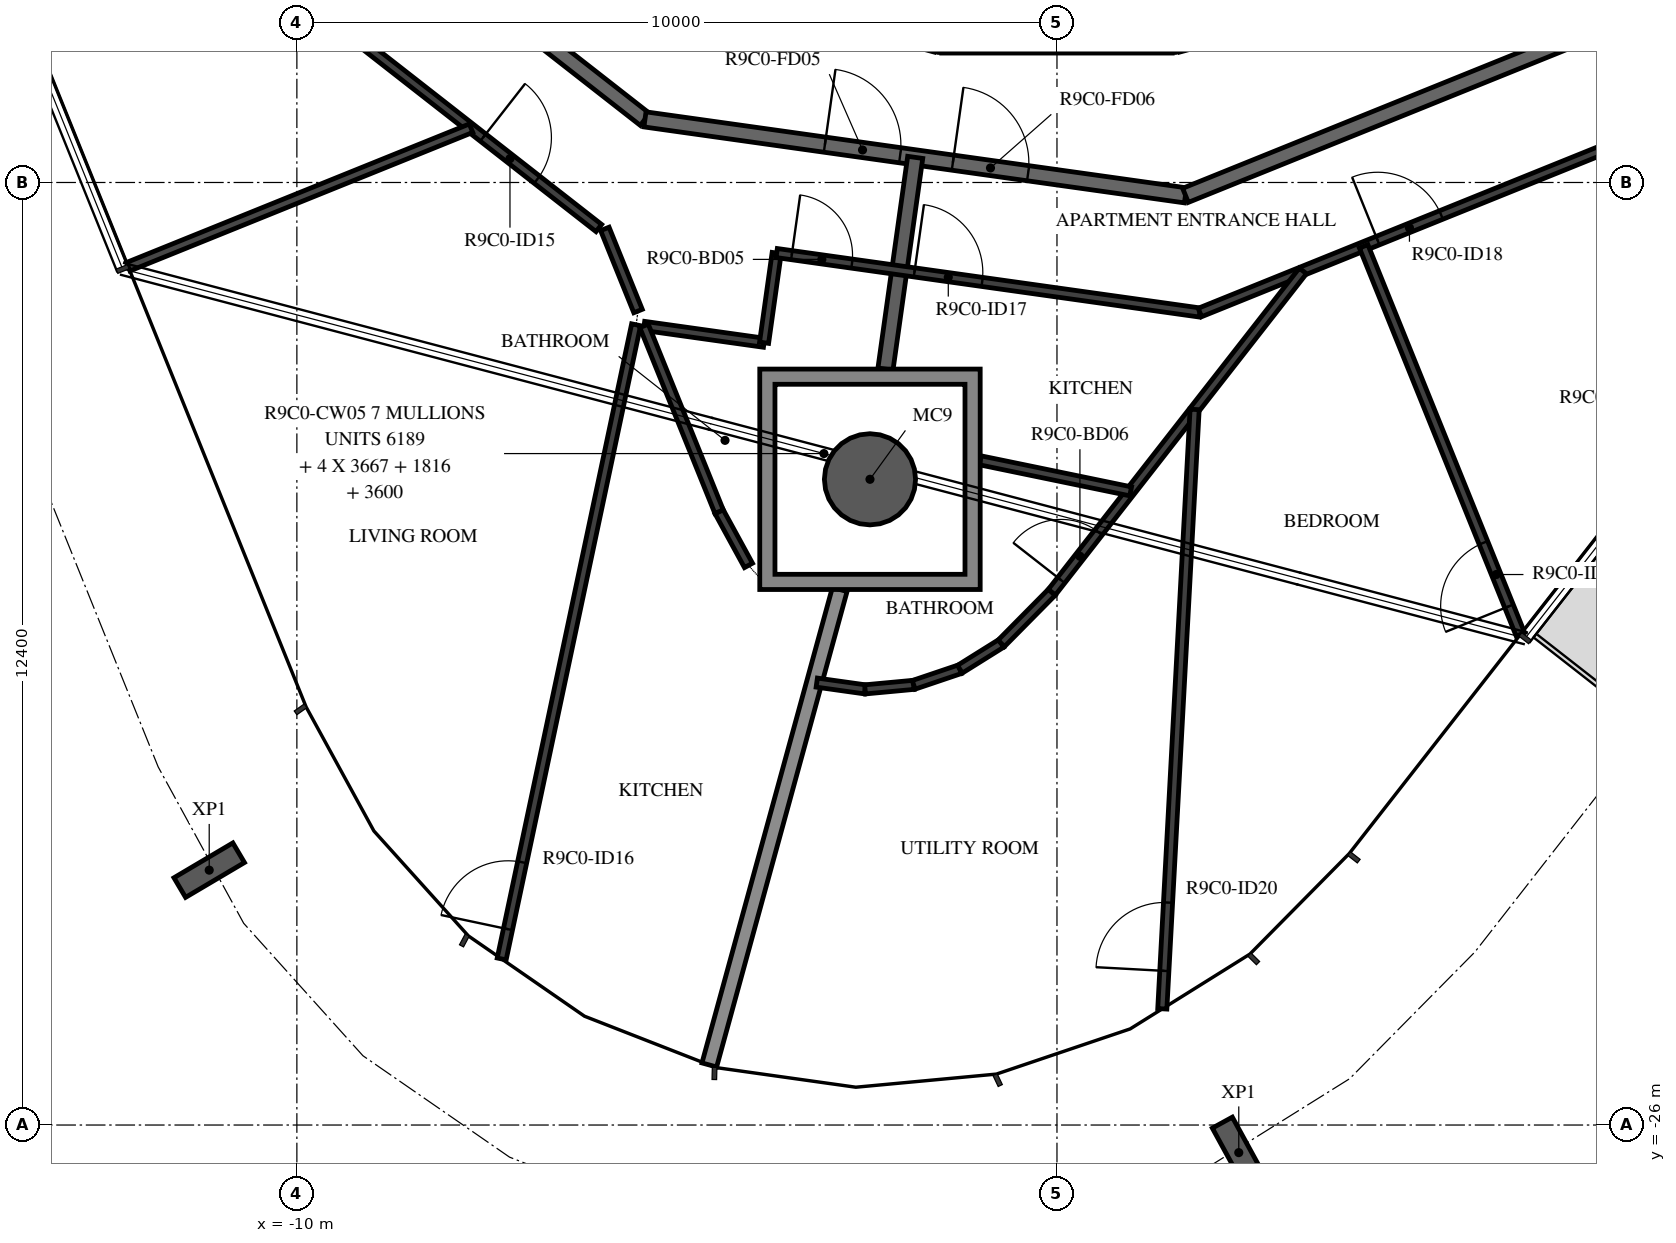
"""IFC4 building model, lengths in metres.
Left out: names, types, materials, properties, quantities, classifications, styles, units other than length and angle.
Written with IfcOpenShell. Run it as: python <this file> out.ifc"""

import sys

from ifc_helpers import new_model, si_unit, direction, frame, frame_2d, origin, origin_2d, place, context, subcontext, project, spatial, polyline, rectangle, hollow_circle, i_section, outline, extrude, element, fill, save


model = new_model("IFC4")
c1 = context("Model", 3, precision=1e-05, world=origin(), true_north=direction((0.0, 1.0)))
c2 = subcontext(c1, "Body", "Model", "MODEL_VIEW")
j1 = project(units=[si_unit("LENGTHUNIT", "METRE"), si_unit("PLANEANGLEUNIT", "RADIAN")], contexts=[c1])
p1 = place(None, origin())
s1 = spatial("IfcSite", under=j1, at=p1, CompositionType="ELEMENT")
p2 = place(p1, origin())
s2 = spatial("IfcBuilding", under=s1, at=p2, CompositionType="ELEMENT")
p3 = place(p2, frame((0.0, 0.0, 354.0)))
s3 = spatial("IfcBuildingStorey", under=s2, at=p3, CompositionType="ELEMENT", Elevation=354.0)
p4 = place(p3, frame((-2.46, -17.505, -0.38), z_axis=(0.0, 0.0, 1.0), x_axis=(1.0, 0.0, 0.0)))
e1 = element("IfcColumn", 1, at=p4, inside=s3, PredefinedType="COLUMN", context=c2, shape_type="SweptSolid", body=[
    extrude(hollow_circle(Radius=0.6, WallThickness=0.03, at=origin_2d()), origin(), (0.0, 0.0, 1.0), 3.5),
])
for number, where, z_axis, x_axis in (
    (2, (-11.153, -22.647, -0.38), (0.0, 0.0, 1.0), (-0.509, 0.861, 0.0)),
    (3, (2.392, -26.363, -0.38), (0.0, 0.0, 1.0), (-0.877, -0.48, 0.0)),
):
    element("IfcColumn", number, at=place(p3, frame(where, z_axis=z_axis, x_axis=x_axis)), inside=s3, PredefinedType="COLUMN", context=c2, shape_type="SweptSolid", body=[
        extrude(i_section(OverallWidth=0.3, OverallDepth=0.9, WebThickness=0.019, FlangeThickness=0.035, FilletRadius=0.03, at=origin_2d()), origin(), (0.0, 0.0, 1.0), 3.5),
    ])
p5 = place(p3, frame((-1.516, -11.647, 0.0), z_axis=(0.0, 0.0, 1.0), x_axis=(1.0, 0.0, 0.0)))
e4 = element("IfcWall", 4, at=p5, inside=s3, PredefinedType="SHEAR", context=c2, shape_type="SweptSolid", body=[
    extrude(rectangle(XDim=3.033, YDim=0.5, at=frame_2d((1.516, 0.0))), origin(), (0.0, 0.0, 1.0), 3.12),
])
p6 = place(p5, frame((0.016, 0.0, 0.0)))
e5 = element("IfcOpeningElement", 5, at=p6, cuts=e4, PredefinedType="OPENING", context=c2, shape_type="SweptSolid", body=[
    extrude(rectangle(XDim=1.2, YDim=2.1, at=frame_2d((0.6, 1.05))), frame((0.0, 0.26, 0.0), z_axis=(0.0, -1.0, 0.0), x_axis=(1.0, 0.0, 0.0)), (0.0, 0.0, 1.0), 0.52),
])
p7 = place(p3, frame((-11.079, -8.349, 0.0), z_axis=(0.0, 0.0, 1.0), x_axis=(0.78800478687, -0.615669112324, 0.0)))
e6 = element("IfcWall", 6, at=p7, inside=s3, PredefinedType="STANDARD", context=c2, shape_type="SweptSolid", body=[
    extrude(rectangle(XDim=7.181, YDim=0.2, at=frame_2d((3.591, 0.0))), origin(), (0.0, 0.0, 1.0), 3.12),
])
p8 = place(p3, frame((-5.42, -12.77, 0.0), z_axis=(0.0, 0.0, 1.0), x_axis=(0.990270565508, -0.139155334385, 0.0)))
e7 = element("IfcWall", 7, at=p8, inside=s3, PredefinedType="STANDARD", context=c2, shape_type="SweptSolid", body=[
    extrude(rectangle(XDim=7.181, YDim=0.2, at=frame_2d((3.59, 0.0))), origin(), (0.0, 0.0, 1.0), 3.12),
])
p9 = place(p8, frame((2.39, 0.0, 0.0)))
e8 = element("IfcOpeningElement", 8, at=p9, cuts=e7, PredefinedType="OPENING", context=c2, shape_type="SweptSolid", body=[
    extrude(rectangle(XDim=1.0, YDim=2.1, at=frame_2d((0.5, 1.05))), frame((0.0, 0.11, 0.0), z_axis=(0.0, -1.0, 0.0), x_axis=(1.0, 0.0, 0.0)), (0.0, 0.0, 1.0), 0.22),
])
p10 = place(p8, frame((4.091, 0.0, 0.0)))
e9 = element("IfcOpeningElement", 9, at=p10, cuts=e7, PredefinedType="OPENING", context=c2, shape_type="SweptSolid", body=[
    extrude(rectangle(XDim=1.0, YDim=2.1, at=frame_2d((0.5, 1.05))), frame((0.0, 0.11, 0.0), z_axis=(0.0, -1.0, 0.0), x_axis=(1.0, 0.0, 0.0)), (0.0, 0.0, 1.0), 0.22),
])
p11 = place(p3, frame((1.691, -13.769, 0.0), z_axis=(0.0, 0.0, 1.0), x_axis=(0.92717916932, 0.374618189599, 0.0)))
e10 = element("IfcWall", 10, at=p11, inside=s3, PredefinedType="STANDARD", context=c2, shape_type="SweptSolid", body=[
    extrude(rectangle(XDim=7.181, YDim=0.2, at=frame_2d((3.591, 0.0))), origin(), (0.0, 0.0, 1.0), 3.12),
])
p12 = place(p3, frame((-2.256, -16.055, 0.0), z_axis=(0.0, 0.0, 1.0), x_axis=(0.139148428478, 0.990271535919, 0.0)))
e11 = element("IfcWall", 11, at=p12, inside=s3, PredefinedType="STANDARD", context=c2, shape_type="SweptSolid", body=[
    extrude(rectangle(XDim=2.812, YDim=0.2, at=frame_2d((1.406, 0.0))), origin(), (0.0, 0.0, 1.0), 3.12),
])
p13 = place(p3, frame((-4.574, -25.21, 0.0), z_axis=(0.0, 0.0, 1.0), x_axis=(0.264579024648, 0.964364007892, 0.0)))
e12 = element("IfcWall", 12, at=p13, inside=s3, PredefinedType="STANDARD", context=c2, shape_type="SweptSolid", body=[
    extrude(rectangle(XDim=6.486, YDim=0.2, at=frame_2d((3.243, 0.0))), origin(), (0.0, 0.0, 1.0), 2.73),
])
p14 = place(p3, frame((-12.319, -9.283, 0.0), z_axis=(0.0, 0.0, 1.0), x_axis=(0.788000268464, -0.61567489546, 0.0)))
e13 = element("IfcWall", 13, at=p14, inside=s3, PredefinedType="PARTITIONING", context=c2, shape_type="SweptSolid", body=[
    extrude(rectangle(XDim=7.985, YDim=0.12, at=frame_2d((3.992, 0.0))), origin(), (0.0, 0.0, 1.0), 3.12),
])
p15 = place(p14, frame((6.051, 0.0, 0.0)))
e14 = element("IfcOpeningElement", 14, at=p15, cuts=e13, PredefinedType="OPENING", context=c2, shape_type="SweptSolid", body=[
    extrude(rectangle(XDim=0.9, YDim=2.1, at=frame_2d((0.45, 1.05))), frame((0.0, 0.07, 0.0), z_axis=(0.0, -1.0, 0.0), x_axis=(1.0, 0.0, 0.0)), (0.0, 0.0, 1.0), 0.14),
])
p16 = place(p3, frame((-5.948, -14.21, 0.0), z_axis=(0.0, 0.0, 1.0), x_axis=(0.374601530156, -0.927185900241, 0.0)))
e15 = element("IfcWall", 15, at=p16, inside=s3, PredefinedType="PARTITIONING", context=c2, shape_type="SweptSolid", body=[
    extrude(rectangle(XDim=1.166, YDim=0.12, at=frame_2d((0.583, 0.0))), origin(), (0.0, 0.0, 1.0), 3.12),
])
p17 = place(p3, frame((-5.433, -15.487, 0.0), z_axis=(0.0, 0.0, 1.0), x_axis=(0.990268451053, -0.139170380644, 0.0)))
e16 = element("IfcWall", 16, at=p17, inside=s3, PredefinedType="PARTITIONING", context=c2, shape_type="SweptSolid", body=[
    extrude(rectangle(XDim=1.595, YDim=0.12, at=frame_2d((0.797, 0.0))), origin(), (0.0, 0.0, 1.0), 3.12),
])
p18 = place(p3, frame((-3.854, -15.708, 0.0), z_axis=(0.0, 0.0, 1.0), x_axis=(0.139298773474, 0.99025039849, 0.0)))
e17 = element("IfcWall", 17, at=p18, inside=s3, PredefinedType="PARTITIONING", context=c2, shape_type="SweptSolid", body=[
    extrude(rectangle(XDim=1.192, YDim=0.12, at=frame_2d((0.596, 0.0))), origin(), (0.0, 0.0, 1.0), 3.12),
])
p19 = place(p3, frame((-3.688, -14.528, 0.0), z_axis=(0.0, 0.0, 1.0), x_axis=(0.990273413633, -0.139135064782, 0.0)))
e18 = element("IfcWall", 18, at=p19, inside=s3, PredefinedType="PARTITIONING", context=c2, shape_type="SweptSolid", body=[
    extrude(rectangle(XDim=5.622, YDim=0.12, at=frame_2d((2.811, 0.0))), origin(), (0.0, 0.0, 1.0), 3.12),
])
p20 = place(p19, frame((0.2, 0.0, 0.0)))
e19 = element("IfcOpeningElement", 19, at=p20, cuts=e18, PredefinedType="OPENING", context=c2, shape_type="SweptSolid", body=[
    extrude(rectangle(XDim=0.8, YDim=2.1, at=frame_2d((0.4, 1.05))), frame((0.0, 0.07, 0.0), z_axis=(0.0, -1.0, 0.0), x_axis=(1.0, 0.0, 0.0)), (0.0, 0.0, 1.0), 0.14),
])
p21 = place(p19, frame((1.83, 0.0, 0.0)))
e20 = element("IfcOpeningElement", 20, at=p21, cuts=e18, PredefinedType="OPENING", context=c2, shape_type="SweptSolid", body=[
    extrude(rectangle(XDim=0.9, YDim=2.1, at=frame_2d((0.45, 1.05))), frame((0.0, 0.07, 0.0), z_axis=(0.0, -1.0, 0.0), x_axis=(1.0, 0.0, 0.0)), (0.0, 0.0, 1.0), 0.14),
])
p22 = place(p3, frame((-12.219, -14.708, 0.0), z_axis=(0.0, 0.0, 1.0), x_axis=(0.927176471086, 0.374624867655, 0.0)))
e21 = element("IfcWall", 21, at=p22, inside=s3, PredefinedType="PARTITIONING", context=c2, shape_type="SweptSolid", body=[
    extrude(rectangle(XDim=4.864, YDim=0.12, at=frame_2d((2.432, 0.0))), origin(), (0.0, 0.0, 1.0), 2.73),
])
p23 = place(p3, frame((-7.305, -23.815, 0.0), z_axis=(0.0, 0.0, 1.0), x_axis=(0.207366409306, 0.978263345062, 0.0)))
e22 = element("IfcWall", 22, at=p23, inside=s3, PredefinedType="PARTITIONING", context=c2, shape_type="SweptSolid", body=[
    extrude(rectangle(XDim=8.529, YDim=0.12, at=frame_2d((4.264, 0.0))), origin(), (0.0, 0.0, 1.0), 3.12),
])
p24 = place(p23, frame((0.4, 0.0, 0.0)))
e23 = element("IfcOpeningElement", 23, at=p24, cuts=e22, PredefinedType="OPENING", context=c2, shape_type="SweptSolid", body=[
    extrude(rectangle(XDim=0.9, YDim=2.1, at=frame_2d((0.45, 1.05))), frame((0.0, 0.07, 0.0), z_axis=(0.0, -1.0, 0.0), x_axis=(1.0, 0.0, 0.0)), (0.0, 0.0, 1.0), 0.14),
])
p25 = place(p3, frame((-4.059, -18.638, 0.0), z_axis=(0.0, 0.0, 1.0), x_axis=(-0.479488268542, 0.877548289458, 0.0)))
e24 = element("IfcWall", 24, at=p25, inside=s3, PredefinedType="PARTITIONING", context=c2, shape_type="SweptSolid", body=[
    extrude(rectangle(XDim=0.807, YDim=0.12, at=frame_2d((0.403, 0.0))), origin(), (0.0, 0.0, 1.0), 3.12),
])
p26 = place(p3, frame((-4.445, -17.93, 0.0), z_axis=(0.0, 0.0, 1.0), x_axis=(-0.374614676827, 0.927180588616, 0.0)))
e25 = element("IfcWall", 25, at=p26, inside=s3, PredefinedType="PARTITIONING", context=c2, shape_type="SweptSolid", body=[
    extrude(rectangle(XDim=2.635, YDim=0.12, at=frame_2d((1.318, 0.0))), origin(), (0.0, 0.0, 1.0), 3.12),
])
p27 = place(p3, frame((1.88, -15.311, 0.0), z_axis=(0.0, 0.0, 1.0), x_axis=(0.927184866592, 0.374604088557, 0.0)))
e26 = element("IfcWall", 26, at=p27, inside=s3, PredefinedType="PARTITIONING", context=c2, shape_type="SweptSolid", body=[
    extrude(rectangle(XDim=7.985, YDim=0.12, at=frame_2d((3.993, 0.0))), origin(), (0.0, 0.0, 1.0), 3.12),
])
p28 = place(p27, frame((2.524, 0.0, 0.0)))
e27 = element("IfcOpeningElement", 27, at=p28, cuts=e26, PredefinedType="OPENING", context=c2, shape_type="SweptSolid", body=[
    extrude(rectangle(XDim=0.9, YDim=2.1, at=frame_2d((0.45, 1.05))), frame((0.0, 0.07, 0.0), z_axis=(0.0, -1.0, 0.0), x_axis=(1.0, 0.0, 0.0)), (0.0, 0.0, 1.0), 0.14),
])
p29 = place(p3, frame((-3.16, -20.179, 0.0), z_axis=(0.0, 0.0, 1.0), x_axis=(0.990266409014, -0.139184910023, 0.0)))
e28 = element("IfcWall", 28, at=p29, inside=s3, PredefinedType="PARTITIONING", context=c2, shape_type="SweptSolid", body=[
    extrude(rectangle(XDim=0.642, YDim=0.12, at=frame_2d((0.321, 0.0))), origin(), (0.0, 0.0, 1.0), 3.12),
])
for number, where, z_axis, x_axis in (
    (29, (-2.524, -20.269, 0.0), (0.0, 0.0, 1.0), (0.996, 0.093, 0.0)),
    (30, (-1.885, -20.209, 0.0), (0.0, 0.0, 1.0), (0.947, 0.32, 0.0)),
    (31, (-1.277, -20.004, 0.0), (0.0, 0.0, 1.0), (0.848, 0.53, 0.0)),
):
    element("IfcWall", number, at=place(p3, frame(where, z_axis=z_axis, x_axis=x_axis)), inside=s3, PredefinedType="PARTITIONING", context=c2, shape_type="SweptSolid", body=[
        extrude(rectangle(XDim=0.642, YDim=0.12, at=frame_2d((0.321, 0.0))), origin(), (0.0, 0.0, 1.0), 3.12),
    ])
p30 = place(p3, frame((-0.733, -19.663, 0.0), z_axis=(0.0, 0.0, 1.0), x_axis=(0.702968734621, 0.711220752049, 0.0)))
e32 = element("IfcWall", 32, at=p30, inside=s3, PredefinedType="PARTITIONING", context=c2, shape_type="SweptSolid", body=[
    extrude(rectangle(XDim=0.947, YDim=0.12, at=frame_2d((0.473, 0.0))), origin(), (0.0, 0.0, 1.0), 3.12),
])
p31 = place(p3, frame((-0.067, -18.99, 0.0), z_axis=(0.0, 0.0, 1.0), x_axis=(0.615678487989, 0.787997461562, 0.0)))
e33 = element("IfcWall", 33, at=p31, inside=s3, PredefinedType="PARTITIONING", context=c2, shape_type="SweptSolid", body=[
    extrude(rectangle(XDim=5.364, YDim=0.12, at=frame_2d((2.682, 0.0))), origin(), (0.0, 0.0, 1.0), 3.12),
])
p32 = place(p31, frame((0.2, 0.0, 0.0)))
e34 = element("IfcOpeningElement", 34, at=p32, cuts=e33, PredefinedType="OPENING", context=c2, shape_type="SweptSolid", body=[
    extrude(rectangle(XDim=0.8, YDim=2.1, at=frame_2d((0.4, 1.05))), frame((0.0, 0.07, 0.0), z_axis=(0.0, -1.0, 0.0), x_axis=(1.0, 0.0, 0.0)), (0.0, 0.0, 1.0), 0.14),
])
p33 = place(p3, frame((0.969, -17.663, 0.0), z_axis=(0.0, 0.0, 1.0), x_axis=(-0.979358667558, 0.202130156776, 0.0)))
e35 = element("IfcWall", 35, at=p33, inside=s3, PredefinedType="PARTITIONING", context=c2, shape_type="SweptSolid", body=[
    extrude(rectangle(XDim=2.021, YDim=0.12, at=frame_2d((1.01, 0.0))), origin(), (0.0, 0.0, 1.0), 3.12),
])
p34 = place(p3, frame((1.386, -24.471, 0.0), z_axis=(0.0, 0.0, 1.0), x_axis=(0.053855287289, 0.998548750954, 0.0)))
e36 = element("IfcWall", 36, at=p34, inside=s3, PredefinedType="PARTITIONING", context=c2, shape_type="SweptSolid", body=[
    extrude(rectangle(XDim=7.897, YDim=0.12, at=frame_2d((3.948, 0.0))), origin(), (0.0, 0.0, 1.0), 3.12),
])
p35 = place(p34, frame((0.5, 0.0, 0.0)))
e37 = element("IfcOpeningElement", 37, at=p35, cuts=e36, PredefinedType="OPENING", context=c2, shape_type="SweptSolid", body=[
    extrude(rectangle(XDim=0.9, YDim=2.1, at=frame_2d((0.45, 1.05))), frame((0.0, 0.07, 0.0), z_axis=(0.0, -1.0, 0.0), x_axis=(1.0, 0.0, 0.0)), (0.0, 0.0, 1.0), 0.14),
])
p36 = place(p3, frame((6.097, -19.546, 0.0), z_axis=(0.0, 0.0, 1.0), x_axis=(-0.374591330213, 0.927190021155, 0.0)))
e38 = element("IfcWall", 38, at=p36, inside=s3, PredefinedType="PARTITIONING", context=c2, shape_type="SweptSolid", body=[
    extrude(rectangle(XDim=5.507, YDim=0.12, at=frame_2d((2.753, 0.0))), origin(), (0.0, 0.0, 1.0), 3.12),
])
p37 = place(p36, frame((0.4, 0.0, 0.0)))
e39 = element("IfcOpeningElement", 39, at=p37, cuts=e38, PredefinedType="OPENING", context=c2, shape_type="SweptSolid", body=[
    extrude(rectangle(XDim=0.9, YDim=2.1, at=frame_2d((0.45, 1.05))), frame((0.0, 0.07, 0.0), z_axis=(0.0, -1.0, 0.0), x_axis=(1.0, 0.0, 0.0)), (0.0, 0.0, 1.0), 0.14),
])
p38 = place(p3, origin())
e40 = element("IfcWall", 40, at=p38, inside=s3, PredefinedType="STANDARD", context=c2, shape_type="SweptSolid", body=[
    extrude(outline(polyline([(-1.01, -16.055), (-1.01, -18.955), (-3.91, -18.955), (-3.91, -16.055), (-1.01, -16.055)]), holes=[polyline([(-3.71, -18.755), (-1.21, -18.755), (-1.21, -16.255), (-3.71, -16.255), (-3.71, -18.755)])]), origin(), (0.0, 0.0, 1.0), 3.12),
])
p39 = place(p9, origin())
e41 = element("IfcDoor", 41, at=p39, inside=s3, OperationType="SINGLE_SWING_RIGHT", PredefinedType="DOOR", context=c2, shape_type="SweptSolid", body=[
    extrude(rectangle(XDim=1.0, YDim=2.1, at=frame_2d((0.5, 1.05))), frame((0.0, 0.025, 0.0), z_axis=(0.0, -1.0, 0.0), x_axis=(1.0, 0.0, 0.0)), (0.0, 0.0, 1.0), 0.05),
])
fill(e8, e41)
p40 = place(p15, origin())
e42 = element("IfcDoor", 42, at=p40, inside=s3, OperationType="SINGLE_SWING_RIGHT", PredefinedType="DOOR", context=c2, shape_type="SweptSolid", body=[
    extrude(rectangle(XDim=0.9, YDim=2.1, at=frame_2d((0.45, 1.05))), frame((0.0, 0.025, 0.0), z_axis=(0.0, -1.0, 0.0), x_axis=(1.0, 0.0, 0.0)), (0.0, 0.0, 1.0), 0.05),
])
fill(e14, e42)
p41 = place(p20, origin())
e43 = element("IfcDoor", 43, at=p41, inside=s3, OperationType="SINGLE_SWING_RIGHT", PredefinedType="DOOR", context=c2, shape_type="SweptSolid", body=[
    extrude(rectangle(XDim=0.8, YDim=2.1, at=frame_2d((0.4, 1.05))), frame((0.0, 0.025, 0.0), z_axis=(0.0, -1.0, 0.0), x_axis=(1.0, 0.0, 0.0)), (0.0, 0.0, 1.0), 0.05),
])
fill(e19, e43)
p42 = place(p24, origin())
e44 = element("IfcDoor", 44, at=p42, inside=s3, OperationType="SINGLE_SWING_RIGHT", PredefinedType="DOOR", context=c2, shape_type="SweptSolid", body=[
    extrude(rectangle(XDim=0.9, YDim=2.1, at=frame_2d((0.45, 1.05))), frame((0.0, 0.025, 0.0), z_axis=(0.0, -1.0, 0.0), x_axis=(1.0, 0.0, 0.0)), (0.0, 0.0, 1.0), 0.05),
])
fill(e23, e44)
p43 = place(p10, origin())
e45 = element("IfcDoor", 45, at=p43, inside=s3, OperationType="SINGLE_SWING_RIGHT", PredefinedType="DOOR", context=c2, shape_type="SweptSolid", body=[
    extrude(rectangle(XDim=1.0, YDim=2.1, at=frame_2d((0.5, 1.05))), frame((0.0, 0.025, 0.0), z_axis=(0.0, -1.0, 0.0), x_axis=(1.0, 0.0, 0.0)), (0.0, 0.0, 1.0), 0.05),
])
fill(e9, e45)
p44 = place(p21, origin())
e46 = element("IfcDoor", 46, at=p44, inside=s3, OperationType="SINGLE_SWING_RIGHT", PredefinedType="DOOR", context=c2, shape_type="SweptSolid", body=[
    extrude(rectangle(XDim=0.9, YDim=2.1, at=frame_2d((0.45, 1.05))), frame((0.0, 0.025, 0.0), z_axis=(0.0, -1.0, 0.0), x_axis=(1.0, 0.0, 0.0)), (0.0, 0.0, 1.0), 0.05),
])
fill(e20, e46)
p45 = place(p28, origin())
e47 = element("IfcDoor", 47, at=p45, inside=s3, OperationType="SINGLE_SWING_LEFT", PredefinedType="DOOR", context=c2, shape_type="SweptSolid", body=[
    extrude(rectangle(XDim=0.9, YDim=2.1, at=frame_2d((0.45, 1.05))), frame((0.0, 0.025, 0.0), z_axis=(0.0, -1.0, 0.0), x_axis=(1.0, 0.0, 0.0)), (0.0, 0.0, 1.0), 0.05),
])
fill(e27, e47)
p46 = place(p37, origin())
e48 = element("IfcDoor", 48, at=p46, inside=s3, OperationType="SINGLE_SWING_LEFT", PredefinedType="DOOR", context=c2, shape_type="SweptSolid", body=[
    extrude(rectangle(XDim=0.9, YDim=2.1, at=frame_2d((0.45, 1.05))), frame((0.0, 0.025, 0.0), z_axis=(0.0, -1.0, 0.0), x_axis=(1.0, 0.0, 0.0)), (0.0, 0.0, 1.0), 0.05),
])
fill(e39, e48)
p47 = place(p35, origin())
e49 = element("IfcDoor", 49, at=p47, inside=s3, OperationType="SINGLE_SWING_LEFT", PredefinedType="DOOR", context=c2, shape_type="SweptSolid", body=[
    extrude(rectangle(XDim=0.9, YDim=2.1, at=frame_2d((0.45, 1.05))), frame((0.0, 0.025, 0.0), z_axis=(0.0, -1.0, 0.0), x_axis=(1.0, 0.0, 0.0)), (0.0, 0.0, 1.0), 0.05),
])
fill(e37, e49)
p48 = place(p32, origin())
e50 = element("IfcDoor", 50, at=p48, inside=s3, OperationType="SINGLE_SWING_RIGHT", PredefinedType="DOOR", context=c2, shape_type="SweptSolid", body=[
    extrude(rectangle(XDim=0.8, YDim=2.1, at=frame_2d((0.4, 1.05))), frame((0.0, 0.025, 0.0), z_axis=(0.0, -1.0, 0.0), x_axis=(1.0, 0.0, 0.0)), (0.0, 0.0, 1.0), 0.05),
])
fill(e34, e50)
save(model, sys.argv[1])
